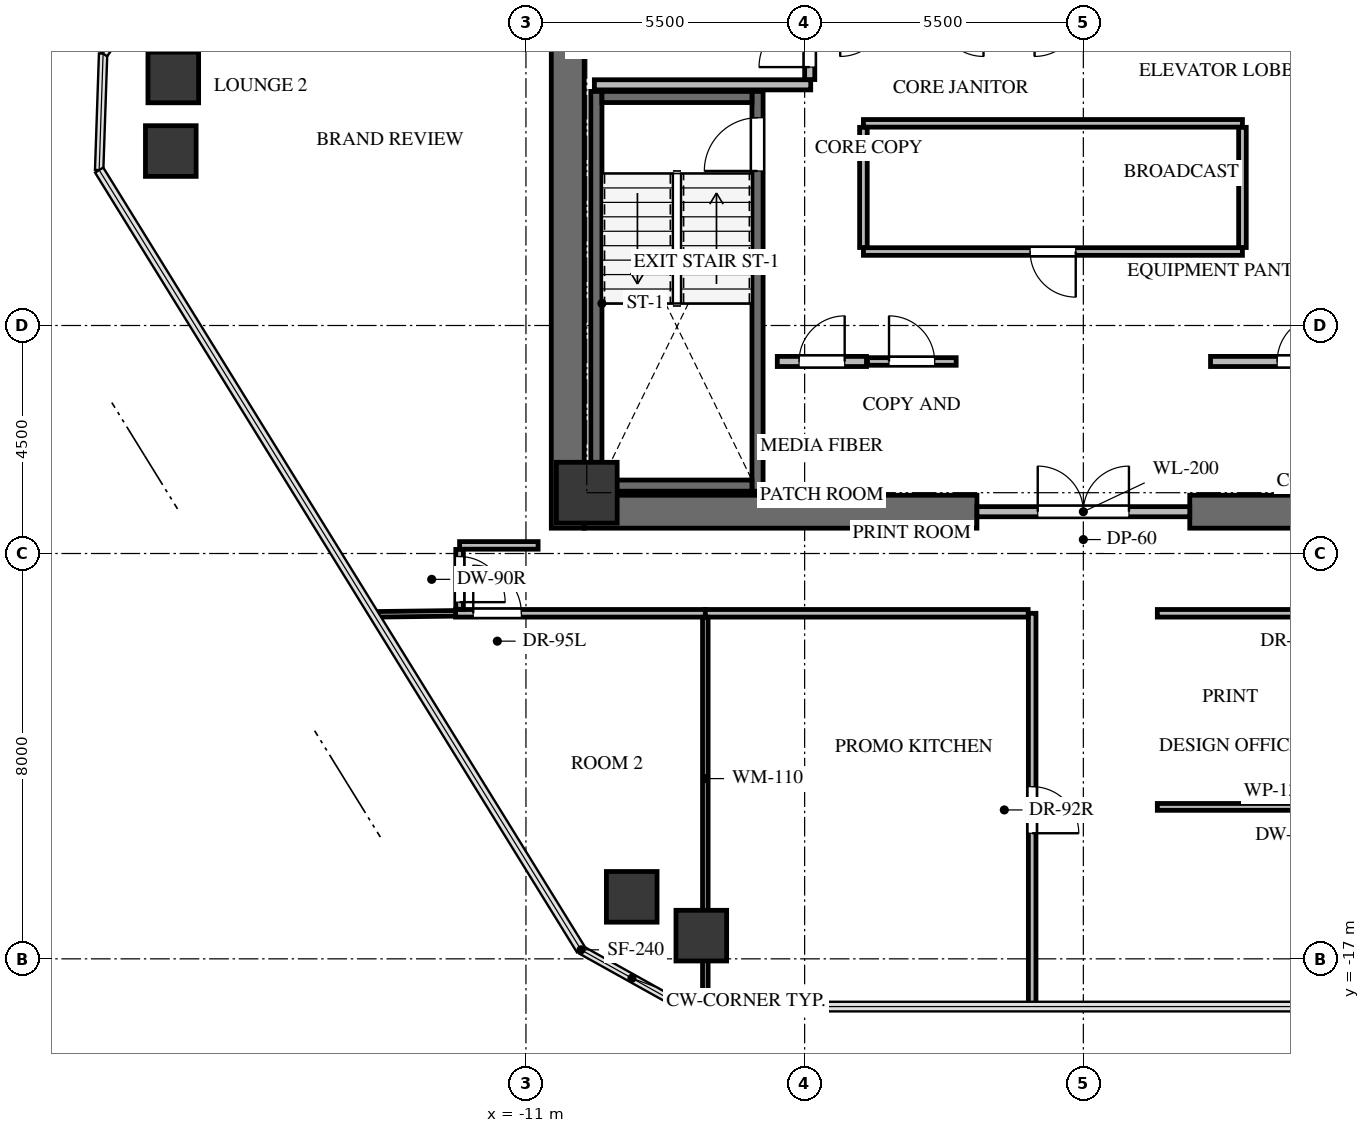
"""IFC4 building model, lengths in metres.
Left out: names, types, materials, properties, quantities, classifications, styles, units other than length and angle.
Written with IfcOpenShell. Run it as: python <this file> out.ifc"""

import sys

from ifc_helpers import new_model, si_unit, direction, frame, frame_2d, origin, origin_2d, place, context, subcontext, project, spatial, rectangle, extrude, source, transform, mapped, element, fill, save


model = new_model("IFC4")
c1 = context("Model", 3, precision=1e-05, world=origin(), true_north=direction((0.0, 1.0)))
c2 = subcontext(c1, "Body", "Model", "MODEL_VIEW")
j1 = project(units=[si_unit("LENGTHUNIT", "METRE"), si_unit("PLANEANGLEUNIT", "RADIAN")], contexts=[c1])
p1 = place(None, origin())
s1 = spatial("IfcSite", under=j1, at=p1, CompositionType="ELEMENT")
p2 = place(p1, origin())
s2 = spatial("IfcBuilding", under=s1, at=p2, CompositionType="ELEMENT")
p3 = place(p2, frame((0.0, 0.0, 190.3)))
s3 = spatial("IfcBuildingStorey", under=s2, at=p3, CompositionType="ELEMENT", Elevation=190.3)
p4 = place(p3, frame((-10.175, -8.5, 0.0), z_axis=(0.0, 0.0, 1.0), x_axis=(0.0, 1.0, 0.0)))
e1 = element("IfcWall", 1, at=p4, inside=s3, PredefinedType="SHEAR", context=c2, shape_type="SweptSolid", body=[
    extrude(rectangle(XDim=17.0, YDim=0.65, at=frame_2d((8.5, 0.0))), origin(), (0.0, 0.0, 1.0), 3.3),
])
for number, where, z_axis, x_axis in (
    (2, (-9.85, -8.175, 0.0), (0.0, 0.0, 1.0), (1.0, 0.0, 0.0)),
    (3, (2.1, -8.175, 0.0), (0.0, 0.0, 1.0), (1.0, 0.0, 0.0)),
):
    element("IfcWall", number, at=place(p3, frame(where, z_axis=z_axis, x_axis=x_axis)), inside=s3, PredefinedType="SHEAR", context=c2, shape_type="SweptSolid", body=[
        extrude(rectangle(XDim=7.75, YDim=0.65, at=frame_2d((3.875, 0.0))), origin(), (0.0, 0.0, 1.0), 3.3),
    ])
p5 = place(p3, frame((-6.43, -7.77, -0.24), z_axis=(0.0, 0.0, 1.0), x_axis=(0.0, 1.0, 0.0)))
e4 = element("IfcWall", 4, at=p5, inside=s3, PredefinedType="SHEAR", context=c2, shape_type="SweptSolid", body=[
    extrude(rectangle(XDim=7.89, YDim=0.22, at=frame_2d((3.945, 0.0))), origin(), (0.0, 0.0, 1.0), 3.3),
])
p6 = place(p5, frame((6.32, 0.0, 0.0)))
e5 = element("IfcOpeningElement", 5, at=p6, cuts=e4, PredefinedType="OPENING", context=c2, shape_type="SweptSolid", body=[
    extrude(rectangle(XDim=1.05, YDim=2.15, at=frame_2d((0.525, 1.075))), frame((0.0, 0.12, 0.0), z_axis=(0.0, -1.0, 0.0), x_axis=(1.0, 0.0, 0.0)), (0.0, 0.0, 1.0), 0.24),
])
p7 = place(p3, frame((-9.61, 0.12, -0.24), z_axis=(0.0, 0.0, 1.0), x_axis=(0.0, -1.0, 0.0)))
e6 = element("IfcWall", 6, at=p7, inside=s3, PredefinedType="SHEAR", context=c2, shape_type="SweptSolid", body=[
    extrude(rectangle(XDim=7.89, YDim=0.22, at=frame_2d((3.945, 0.0))), origin(), (0.0, 0.0, 1.0), 3.3),
])
for number, where, z_axis, x_axis in (
    (7, (-9.5, -7.66, -0.24), (0.0, 0.0, 1.0), (1.0, 0.0, 0.0)),
    (8, (-6.54, 0.01, -0.24), (0.0, 0.0, 1.0), (-1.0, 0.0, 0.0)),
):
    element("IfcWall", number, at=place(p3, frame(where, z_axis=z_axis, x_axis=x_axis)), inside=s3, PredefinedType="SHEAR", context=c2, shape_type="SweptSolid", body=[
        extrude(rectangle(XDim=2.96, YDim=0.22, at=frame_2d((1.48, 0.0))), origin(), (0.0, 0.0, 1.0), 3.3),
    ])
m1 = source(origin(), c2, "Body", "SweptSolid", [
    extrude(rectangle(XDim=1.2, YDim=1.2, at=origin_2d()), origin(), (0.0, 0.0, 1.0), 3.3),
])
p8 = place(p3, frame((-9.8, -7.8, -0.24), z_axis=(0.0, 0.0, 1.0), x_axis=(1.0, 0.0, 0.0)))
e9 = element("IfcColumn", 9, at=p8, inside=s3, PredefinedType="COLUMN", context=c2, shape_type="MappedRepresentation", body=[
    mapped(m1, transform((0.0, 0.0, 0.0), x_axis=(1.0, 0.0, 0.0), y_axis=(0.0, 1.0, 0.0), z_axis=(0.0, 0.0, 1.0), scale=1.0)),
])
m2 = source(origin(), c2, "Body", "SweptSolid", [
    extrude(rectangle(XDim=1.0, YDim=1.0, at=origin_2d()), origin(), (0.0, 0.0, 1.0), 3.3),
])
for number, where, z_axis, x_axis in (
    (10, (-8.913, -15.776, -0.24), (0.0, 0.0, 1.0), (1.0, 0.0, 0.0)),
    (11, (-18.009, -1.057, -0.24), (0.0, 0.0, 1.0), (1.0, 0.0, 0.0)),
    (12, (-17.96, 0.396, -0.24), (0.0, 0.0, 1.0), (1.0, 0.0, 0.0)),
    (13, (-7.54, -16.542, -0.24), (0.0, 0.0, 1.0), (1.0, 0.0, 0.0)),
):
    element("IfcColumn", number, at=place(p3, frame(where, z_axis=z_axis, x_axis=x_axis)), inside=s3, PredefinedType="COLUMN", context=c2, shape_type="MappedRepresentation", body=[
        mapped(m2, transform((0.0, 0.0, 0.0), x_axis=(1.0, 0.0, 0.0), y_axis=(0.0, 1.0, 0.0), z_axis=(0.0, 0.0, 1.0), scale=1.0)),
    ])
p9 = place(p3, frame((-2.1, -8.175, 0.0), z_axis=(0.0, 0.0, 1.0), x_axis=(1.0, 0.0, 0.0)))
e14 = element("IfcWall", 14, at=p9, inside=s3, PredefinedType="SOLIDWALL", context=c2, shape_type="SweptSolid", body=[
    extrude(rectangle(XDim=4.2, YDim=0.2, at=frame_2d((2.1, 0.0))), origin(), (0.0, 0.0, 1.0), 3.045),
])
p10 = place(p9, frame((1.2, 0.0, 0.0)))
e15 = element("IfcOpeningElement", 15, at=p10, cuts=e14, PredefinedType="OPENING", context=c2, shape_type="SweptSolid", body=[
    extrude(rectangle(XDim=1.8, YDim=2.15, at=frame_2d((0.9, 1.075))), frame((0.0, 0.11, 0.0), z_axis=(0.0, -1.0, 0.0), x_axis=(1.0, 0.0, 0.0)), (0.0, 0.0, 1.0), 0.22),
])
p11 = place(p3, frame((-9.65, 0.25, 0.0), z_axis=(0.0, 0.0, 1.0), x_axis=(1.0, 0.0, 0.0)))
e16 = element("IfcWall", 16, at=p11, inside=s3, PredefinedType="SOLIDWALL", context=c2, shape_type="SweptSolid", body=[
    extrude(rectangle(XDim=4.27, YDim=0.2, at=frame_2d((2.135, 0.0))), origin(), (0.0, 0.0, 1.0), 3.045),
])
p12 = place(p3, frame((-5.4, 0.354, 0.0), z_axis=(0.0, 0.0, 1.0), x_axis=(0.0, 1.0, 0.0)))
e17 = element("IfcWall", 17, at=p12, inside=s3, PredefinedType="SOLIDWALL", context=c2, shape_type="SweptSolid", body=[
    extrude(rectangle(XDim=4.026, YDim=0.2, at=frame_2d((2.013, 0.0))), origin(), (0.0, 0.0, 1.0), 3.045),
])
p13 = place(p12, frame((0.246, 0.0, 0.0)))
e18 = element("IfcOpeningElement", 18, at=p13, cuts=e17, PredefinedType="OPENING", context=c2, shape_type="SweptSolid", body=[
    extrude(rectangle(XDim=1.0, YDim=2.15, at=frame_2d((0.5, 1.075))), frame((0.0, 0.11, 0.0), z_axis=(0.0, -1.0, 0.0), x_axis=(1.0, 0.0, 0.0)), (0.0, 0.0, 1.0), 0.22),
])
p14 = place(p3, frame((-6.04, -5.21, 0.0), z_axis=(0.0, 0.0, 1.0), x_axis=(1.0, 0.0, 0.0)))
e19 = element("IfcWall", 19, at=p14, inside=s3, PredefinedType="SOLIDWALL", context=c2, shape_type="SweptSolid", body=[
    extrude(rectangle(XDim=1.76, YDim=0.2, at=frame_2d((0.88, 0.0))), origin(), (0.0, 0.0, 1.0), 3.045),
])
p15 = place(p14, frame((0.43, 0.0, 0.0)))
e20 = element("IfcOpeningElement", 20, at=p15, cuts=e19, PredefinedType="OPENING", context=c2, shape_type="SweptSolid", body=[
    extrude(rectangle(XDim=0.9, YDim=2.05, at=frame_2d((0.45, 1.025))), frame((0.0, 0.11, 0.0), z_axis=(0.0, -1.0, 0.0), x_axis=(1.0, 0.0, 0.0)), (0.0, 0.0, 1.0), 0.22),
])
p16 = place(p3, frame((-4.26, -5.21, 0.0), z_axis=(0.0, 0.0, 1.0), x_axis=(1.0, 0.0, 0.0)))
e21 = element("IfcWall", 21, at=p16, inside=s3, PredefinedType="PARTITIONING", context=c2, shape_type="SweptSolid", body=[
    extrude(rectangle(XDim=1.75, YDim=0.15, at=frame_2d((0.875, 0.0))), origin(), (0.0, 0.0, 1.0), 3.045),
])
p17 = place(p16, frame((0.425, 0.0, 0.0)))
e22 = element("IfcOpeningElement", 22, at=p17, cuts=e21, PredefinedType="OPENING", context=c2, shape_type="SweptSolid", body=[
    extrude(rectangle(XDim=0.9, YDim=2.05, at=frame_2d((0.45, 1.025))), frame((0.0, 0.085, 0.0), z_axis=(0.0, -1.0, 0.0), x_axis=(1.0, 0.0, 0.0)), (0.0, 0.0, 1.0), 0.17),
])
p18 = place(p3, frame((2.51, -5.21, 0.0), z_axis=(0.0, 0.0, 1.0), x_axis=(1.0, 0.0, 0.0)))
e23 = element("IfcWall", 23, at=p18, inside=s3, PredefinedType="SOLIDWALL", context=c2, shape_type="SweptSolid", body=[
    extrude(rectangle(XDim=3.53, YDim=0.2, at=frame_2d((1.765, 0.0))), origin(), (0.0, 0.0, 1.0), 3.045),
])
p19 = place(p18, frame((1.315, 0.0, 0.0)))
e24 = element("IfcOpeningElement", 24, at=p19, cuts=e23, PredefinedType="OPENING", context=c2, shape_type="SweptSolid", body=[
    extrude(rectangle(XDim=0.9, YDim=2.05, at=frame_2d((0.45, 1.025))), frame((0.0, 0.11, 0.0), z_axis=(0.0, -1.0, 0.0), x_axis=(1.0, 0.0, 0.0)), (0.0, 0.0, 1.0), 0.22),
])
p20 = place(p3, frame((3.14, -3.04, 0.0), z_axis=(0.0, 0.0, 1.0), x_axis=(-1.0, 0.0, 0.0)))
e25 = element("IfcWall", 25, at=p20, inside=s3, PredefinedType="PARTITIONING", context=c2, shape_type="SweptSolid", body=[
    extrude(rectangle(XDim=7.48, YDim=0.15, at=frame_2d((3.74, 0.0))), origin(), (0.0, 0.0, 1.0), 3.045),
])
p21 = place(p20, frame((3.29, 0.0, 0.0)))
e26 = element("IfcOpeningElement", 26, at=p21, cuts=e25, PredefinedType="OPENING", context=c2, shape_type="SweptSolid", body=[
    extrude(rectangle(XDim=0.9, YDim=2.05, at=frame_2d((0.45, 1.025))), frame((0.0, 0.085, 0.0), z_axis=(0.0, -1.0, 0.0), x_axis=(1.0, 0.0, 0.0)), (0.0, 0.0, 1.0), 0.17),
])
p22 = place(p3, frame((-4.34, -0.51, 0.0), z_axis=(0.0, 0.0, 1.0), x_axis=(1.0, 0.0, 0.0)))
e27 = element("IfcWall", 27, at=p22, inside=s3, PredefinedType="PARTITIONING", context=c2, shape_type="SweptSolid", body=[
    extrude(rectangle(XDim=7.48, YDim=0.15, at=frame_2d((3.74, 0.0))), origin(), (0.0, 0.0, 1.0), 3.045),
])
for number, where, z_axis, x_axis in (
    (28, (-4.34, -2.961, 0.0), (0.0, 0.0, 1.0), (0.0, 1.0, 0.0)),
    (29, (3.14, -0.589, 0.0), (0.0, 0.0, 1.0), (0.0, -1.0, 0.0)),
):
    element("IfcWall", number, at=place(p3, frame(where, z_axis=z_axis, x_axis=x_axis)), inside=s3, PredefinedType="PARTITIONING", context=c2, shape_type="SweptSolid", body=[
        extrude(rectangle(XDim=2.372, YDim=0.15, at=frame_2d((1.186, 0.0))), origin(), (0.0, 0.0, 1.0), 3.045),
    ])
p23 = place(p3, frame((-12.39, -10.18, 0.0), z_axis=(0.0, 0.0, 1.0), x_axis=(1.0, 0.0, 0.0)))
e30 = element("IfcWall", 30, at=p23, inside=s3, PredefinedType="PARTITIONING", context=c2, shape_type="SweptSolid", body=[
    extrude(rectangle(XDim=4.93, YDim=0.15, at=frame_2d((2.465, 0.0))), origin(), (0.0, 0.0, 1.0), 2.399),
])
p24 = place(p23, frame((0.35, 0.0, 0.0)))
e31 = element("IfcOpeningElement", 31, at=p24, cuts=e30, PredefinedType="OPENING", context=c2, shape_type="SweptSolid", body=[
    extrude(rectangle(XDim=0.95, YDim=2.1, at=frame_2d((0.475, 1.05))), frame((0.0, 0.085, 0.0), z_axis=(0.0, -1.0, 0.0), x_axis=(1.0, 0.0, 0.0)), (0.0, 0.0, 1.0), 0.17),
])
p25 = place(p3, frame((-1.01, -10.18, 0.0), z_axis=(0.0, 0.0, 1.0), x_axis=(0.0, -1.0, 0.0)))
e32 = element("IfcWall", 32, at=p25, inside=s3, PredefinedType="PARTITIONING", context=c2, shape_type="SweptSolid", body=[
    extrude(rectangle(XDim=7.762, YDim=0.15, at=frame_2d((3.881, 0.0))), origin(), (0.0, 0.0, 1.0), 2.399),
])
p26 = place(p25, frame((3.421, 0.0, 0.0)))
e33 = element("IfcOpeningElement", 33, at=p26, cuts=e32, PredefinedType="OPENING", context=c2, shape_type="SweptSolid", body=[
    extrude(rectangle(XDim=0.92, YDim=2.1, at=frame_2d((0.46, 1.05))), frame((0.0, 0.085, 0.0), z_axis=(0.0, -1.0, 0.0), x_axis=(1.0, 0.0, 0.0)), (0.0, 0.0, 1.0), 0.17),
])
p27 = place(p3, frame((-7.46, -10.18, 0.0), z_axis=(0.0, 0.0, 1.0), x_axis=(1.0, 0.0, 0.0)))
e34 = element("IfcWall", 34, at=p27, inside=s3, PredefinedType="PARTITIONING", context=c2, shape_type="SweptSolid", body=[
    extrude(rectangle(XDim=6.371, YDim=0.15, at=frame_2d((3.186, 0.0))), origin(), (0.0, 0.0, 1.0), 2.242),
])
p28 = place(p3, frame((1.46, -10.18, 0.0), z_axis=(0.0, 0.0, 1.0), x_axis=(1.0, 0.0, 0.0)))
e35 = element("IfcWall", 35, at=p28, inside=s3, PredefinedType="PARTITIONING", context=c2, shape_type="SweptSolid", body=[
    extrude(rectangle(XDim=7.58, YDim=0.15, at=frame_2d((3.79, 0.0))), origin(), (0.0, 0.0, 1.0), 2.242),
])
p29 = place(p28, frame((3.33, 0.0, 0.0)))
e36 = element("IfcOpeningElement", 36, at=p29, cuts=e35, PredefinedType="OPENING", context=c2, shape_type="SweptSolid", body=[
    extrude(rectangle(XDim=0.92, YDim=2.1, at=frame_2d((0.46, 1.05))), frame((0.0, 0.085, 0.0), z_axis=(0.0, -1.0, 0.0), x_axis=(1.0, 0.0, 0.0)), (0.0, 0.0, 1.0), 0.17),
])
p30 = place(p3, frame((-10.76, -8.84, 0.0), z_axis=(0.0, 0.0, 1.0), x_axis=(-1.0, 0.0, 0.0)))
e37 = element("IfcWall", 37, at=p30, inside=s3, PredefinedType="PARTITIONING", context=c2, shape_type="SweptSolid", body=[
    extrude(rectangle(XDim=1.55, YDim=0.15, at=frame_2d((0.775, 0.0))), origin(), (0.0, 0.0, 1.0), 3.045),
])
p31 = place(p3, frame((-12.31, -8.919, 0.0), z_axis=(0.0, 0.0, 1.0), x_axis=(0.0, -1.0, 0.0)))
e38 = element("IfcWall", 38, at=p31, inside=s3, PredefinedType="PARTITIONING", context=c2, shape_type="SweptSolid", body=[
    extrude(rectangle(XDim=1.182, YDim=0.15, at=frame_2d((0.591, 0.0))), origin(), (0.0, 0.0, 1.0), 2.399),
])
p32 = place(p31, frame((0.141, 0.0, 0.0)))
e39 = element("IfcOpeningElement", 39, at=p32, cuts=e38, PredefinedType="OPENING", context=c2, shape_type="SweptSolid", body=[
    extrude(rectangle(XDim=0.9, YDim=2.05, at=frame_2d((0.45, 1.025))), frame((0.0, 0.085, 0.0), z_axis=(0.0, -1.0, 0.0), x_axis=(1.0, 0.0, 0.0)), (0.0, 0.0, 1.0), 0.17),
])
p33 = place(p3, frame((-7.46, -10.259, 0.0), z_axis=(0.0, 0.0, 1.0), x_axis=(0.0, -1.0, 0.0)))
e40 = element("IfcWall", 40, at=p33, inside=s3, PredefinedType="MOVABLE", context=c2, shape_type="SweptSolid", body=[
    extrude(rectangle(XDim=6.367, YDim=0.11, at=frame_2d((3.184, 0.0))), origin(), (0.0, 0.0, 1.0), 2.242),
])
p34 = place(p3, frame((-7.46, -16.626, 0.0), z_axis=(0.0, 0.0, 1.0), x_axis=(0.0, -1.0, 0.0)))
e41 = element("IfcWall", 41, at=p34, inside=s3, PredefinedType="MOVABLE", context=c2, shape_type="SweptSolid", body=[
    extrude(rectangle(XDim=1.316, YDim=0.11, at=frame_2d((0.658, 0.0))), origin(), (0.0, 0.0, 1.0), 1.877),
])
p35 = place(p3, frame((-14.004, -10.201, 0.0), z_axis=(0.0, 0.0, 1.0), x_axis=(0.999923084603, 0.012402615782, 0.0)))
e42 = element("IfcWall", 42, at=p35, inside=s3, PredefinedType="MOVABLE", context=c2, shape_type="SweptSolid", body=[
    extrude(rectangle(XDim=1.614, YDim=0.11, at=frame_2d((0.807, 0.0))), origin(), (0.0, 0.0, 1.0), 2.399),
])
p36 = place(p3, frame((1.46, -14.001, 0.0), z_axis=(0.0, 0.0, 1.0), x_axis=(1.0, 0.0, 0.0)))
e43 = element("IfcWall", 43, at=p36, inside=s3, PredefinedType="PARTITIONING", context=c2, shape_type="SweptSolid", body=[
    extrude(rectangle(XDim=7.58, YDim=0.135, at=frame_2d((3.79, 0.0))), origin(), (0.0, 0.0, 1.0), 2.242),
])
p37 = place(p36, frame((3.34, 0.0, 0.0)))
e44 = element("IfcOpeningElement", 44, at=p37, cuts=e43, PredefinedType="OPENING", context=c2, shape_type="SweptSolid", body=[
    extrude(rectangle(XDim=0.9, YDim=2.05, at=frame_2d((0.45, 1.025))), frame((0.0, 0.078, 0.0), z_axis=(0.0, -1.0, 0.0), x_axis=(1.0, 0.0, 0.0)), (0.0, 0.0, 1.0), 0.155),
])
m3 = source(origin(), c2, "Body", "SweptSolid", [
    extrude(rectangle(XDim=1.05, YDim=2.15, at=frame_2d((0.525, 1.075))), frame((0.0, 0.025, 0.0), z_axis=(0.0, -1.0, 0.0), x_axis=(1.0, 0.0, 0.0)), (0.0, 0.0, 1.0), 0.05),
])
p38 = place(p6, origin())
e45 = element("IfcDoor", 45, at=p38, inside=s3, OperationType="SINGLE_SWING_LEFT", PredefinedType="DOOR", context=c2, shape_type="MappedRepresentation", body=[
    mapped(m3, transform((0.0, 0.0, 0.0), x_axis=(1.0, 0.0, 0.0), y_axis=(0.0, 1.0, 0.0), z_axis=(0.0, 0.0, 1.0), scale=1.0)),
])
fill(e5, e45)
m4 = source(origin(), c2, "Body", "SweptSolid", [
    extrude(rectangle(XDim=1.8, YDim=2.15, at=frame_2d((0.9, 1.075))), frame((0.0, 0.025, 0.0), z_axis=(0.0, -1.0, 0.0), x_axis=(1.0, 0.0, 0.0)), (0.0, 0.0, 1.0), 0.05),
])
p39 = place(p10, origin())
e46 = element("IfcDoor", 46, at=p39, inside=s3, OperationType="DOUBLE_DOOR_SINGLE_SWING", PredefinedType="DOOR", context=c2, shape_type="MappedRepresentation", body=[
    mapped(m4, transform((0.0, 0.0, 0.0), x_axis=(1.0, 0.0, 0.0), y_axis=(0.0, 1.0, 0.0), z_axis=(0.0, 0.0, 1.0), scale=1.0)),
])
fill(e15, e46)
m5 = source(origin(), c2, "Body", "SweptSolid", [
    extrude(rectangle(XDim=1.0, YDim=2.15, at=frame_2d((0.5, 1.075))), frame((0.0, 0.025, 0.0), z_axis=(0.0, -1.0, 0.0), x_axis=(1.0, 0.0, 0.0)), (0.0, 0.0, 1.0), 0.05),
])
p40 = place(p13, origin())
e47 = element("IfcDoor", 47, at=p40, inside=s3, OperationType="SINGLE_SWING_LEFT", PredefinedType="DOOR", context=c2, shape_type="MappedRepresentation", body=[
    mapped(m5, transform((0.0, 0.0, 0.0), x_axis=(1.0, 0.0, 0.0), y_axis=(0.0, 1.0, 0.0), z_axis=(0.0, 0.0, 1.0), scale=1.0)),
])
fill(e18, e47)
m6 = source(origin(), c2, "Body", "SweptSolid", [
    extrude(rectangle(XDim=0.9, YDim=2.05, at=frame_2d((0.45, 1.025))), frame((0.0, 0.025, 0.0), z_axis=(0.0, -1.0, 0.0), x_axis=(1.0, 0.0, 0.0)), (0.0, 0.0, 1.0), 0.05),
])
p41 = place(p15, origin())
e48 = element("IfcDoor", 48, at=p41, inside=s3, OperationType="SINGLE_SWING_RIGHT", PredefinedType="DOOR", context=c2, shape_type="MappedRepresentation", body=[
    mapped(m6, transform((0.0, 0.0, 0.0), x_axis=(1.0, 0.0, 0.0), y_axis=(0.0, 1.0, 0.0), z_axis=(0.0, 0.0, 1.0), scale=1.0)),
])
fill(e20, e48)
m7 = source(origin(), c2, "Body", "SweptSolid", [
    extrude(rectangle(XDim=0.9, YDim=2.05, at=frame_2d((0.45, 1.025))), frame((0.0, 0.025, 0.0), z_axis=(0.0, -1.0, 0.0), x_axis=(1.0, 0.0, 0.0)), (0.0, 0.0, 1.0), 0.05),
])
p42 = place(p17, origin())
e49 = element("IfcDoor", 49, at=p42, inside=s3, OperationType="SINGLE_SWING_LEFT", PredefinedType="DOOR", context=c2, shape_type="MappedRepresentation", body=[
    mapped(m7, transform((0.0, 0.0, 0.0), x_axis=(1.0, 0.0, 0.0), y_axis=(0.0, 1.0, 0.0), z_axis=(0.0, 0.0, 1.0), scale=1.0)),
])
fill(e22, e49)
p43 = place(p19, origin())
e50 = element("IfcDoor", 50, at=p43, inside=s3, OperationType="SINGLE_SWING_RIGHT", PredefinedType="DOOR", context=c2, shape_type="MappedRepresentation", body=[
    mapped(m6, transform((0.0, 0.0, 0.0), x_axis=(1.0, 0.0, 0.0), y_axis=(0.0, 1.0, 0.0), z_axis=(0.0, 0.0, 1.0), scale=1.0)),
])
fill(e24, e50)
p44 = place(p21, origin())
e51 = element("IfcDoor", 51, at=p44, inside=s3, OperationType="SINGLE_SWING_LEFT", PredefinedType="DOOR", context=c2, shape_type="MappedRepresentation", body=[
    mapped(m7, transform((0.0, 0.0, 0.0), x_axis=(1.0, 0.0, 0.0), y_axis=(0.0, 1.0, 0.0), z_axis=(0.0, 0.0, 1.0), scale=1.0)),
])
fill(e26, e51)
m8 = source(origin(), c2, "Body", "SweptSolid", [
    extrude(rectangle(XDim=0.95, YDim=2.1, at=frame_2d((0.475, 1.05))), frame((0.0, 0.025, 0.0), z_axis=(0.0, -1.0, 0.0), x_axis=(1.0, 0.0, 0.0)), (0.0, 0.0, 1.0), 0.05),
])
p45 = place(p24, origin())
e52 = element("IfcDoor", 52, at=p45, inside=s3, OperationType="SINGLE_SWING_LEFT", PredefinedType="DOOR", context=c2, shape_type="MappedRepresentation", body=[
    mapped(m8, transform((0.0, 0.0, 0.0), x_axis=(1.0, 0.0, 0.0), y_axis=(0.0, 1.0, 0.0), z_axis=(0.0, 0.0, 1.0), scale=1.0)),
])
fill(e31, e52)
m9 = source(origin(), c2, "Body", "SweptSolid", [
    extrude(rectangle(XDim=0.92, YDim=2.1, at=frame_2d((0.46, 1.05))), frame((0.0, 0.025, 0.0), z_axis=(0.0, -1.0, 0.0), x_axis=(1.0, 0.0, 0.0)), (0.0, 0.0, 1.0), 0.05),
])
p46 = place(p26, origin())
e53 = element("IfcDoor", 53, at=p46, inside=s3, OperationType="SINGLE_SWING_RIGHT", PredefinedType="DOOR", context=c2, shape_type="MappedRepresentation", body=[
    mapped(m9, transform((0.0, 0.0, 0.0), x_axis=(1.0, 0.0, 0.0), y_axis=(0.0, 1.0, 0.0), z_axis=(0.0, 0.0, 1.0), scale=1.0)),
])
fill(e33, e53)
m10 = source(origin(), c2, "Body", "SweptSolid", [
    extrude(rectangle(XDim=0.9, YDim=2.05, at=frame_2d((0.45, 1.025))), frame((0.0, 0.025, 0.0), z_axis=(0.0, -1.0, 0.0), x_axis=(1.0, 0.0, 0.0)), (0.0, 0.0, 1.0), 0.05),
])
p47 = place(p32, origin())
e54 = element("IfcDoor", 54, at=p47, inside=s3, OperationType="SINGLE_SWING_RIGHT", PredefinedType="DOOR", context=c2, shape_type="MappedRepresentation", body=[
    mapped(m10, transform((0.0, 0.0, 0.0), x_axis=(1.0, 0.0, 0.0), y_axis=(0.0, 1.0, 0.0), z_axis=(0.0, 0.0, 1.0), scale=1.0)),
])
fill(e39, e54)
save(model, sys.argv[1])
